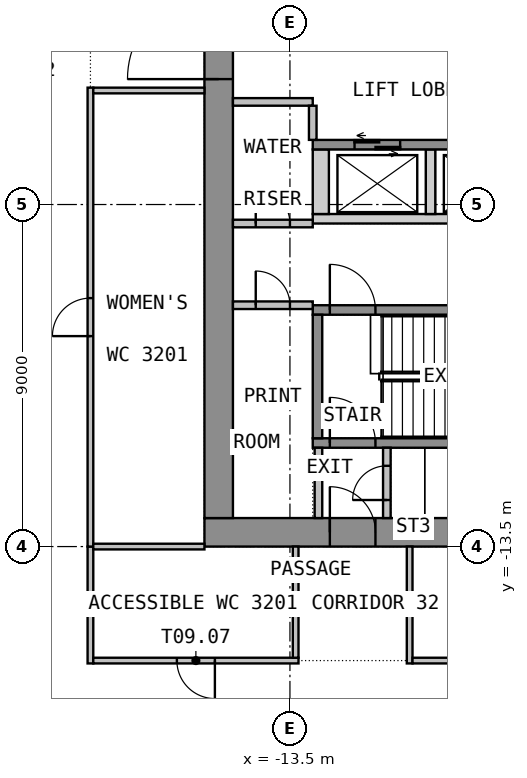
"""IFC4 building model, lengths in metres.
Left out: names, types, materials, properties, quantities, classifications, styles, units other than length and angle.
Written with IfcOpenShell. Run it as: python <this file> out.ifc"""

import sys

from ifc_helpers import new_model, si_unit, direction, frame, frame_2d, origin, place, context, subcontext, project, spatial, polyline, rectangle, outline, extrude, element, fill, save


model = new_model("IFC4")
c1 = context("Model", 3, precision=1e-05, world=origin(), true_north=direction((0.0, 1.0)))
c2 = subcontext(c1, "Body", "Model", "MODEL_VIEW")
j1 = project(units=[si_unit("LENGTHUNIT", "METRE"), si_unit("PLANEANGLEUNIT", "RADIAN")], contexts=[c1])
p1 = place(None, origin())
s1 = spatial("IfcSite", under=j1, at=p1, CompositionType="ELEMENT")
p2 = place(p1, origin())
s2 = spatial("IfcBuilding", under=s1, at=p2, CompositionType="ELEMENT")
p3 = place(p2, frame((0.0, 0.0, 132.6)))
s3 = spatial("IfcBuildingStorey", under=s2, at=p3, CompositionType="ELEMENT", Elevation=132.6)
p4 = place(p3, frame((-15.75, -13.125, 0.0), z_axis=(0.0, 0.0, 1.0), x_axis=(1.0, 0.0, 0.0)))
e1 = element("IfcWall", 1, at=p4, inside=s3, PredefinedType="SHEAR", context=c2, shape_type="SweptSolid", body=[
    extrude(rectangle(XDim=31.5, YDim=0.75, at=frame_2d((15.75, 0.0))), origin(), (0.0, 0.0, 1.0), 3.575),
])
p5 = place(p4, frame((14.55, 0.0, 0.0)))
e2 = element("IfcOpeningElement", 2, at=p5, cuts=e1, PredefinedType="OPENING", context=c2, shape_type="SweptSolid", body=[
    extrude(rectangle(XDim=2.4, YDim=2.1, at=frame_2d((1.2, 1.05))), frame((0.0, 0.385, 0.0), z_axis=(0.0, -1.0, 0.0), x_axis=(1.0, 0.0, 0.0)), (0.0, 0.0, 1.0), 0.77),
])
p6 = place(p4, frame((3.3, 0.0, 0.0)))
e3 = element("IfcOpeningElement", 3, at=p6, cuts=e1, PredefinedType="OPENING", context=c2, shape_type="SweptSolid", body=[
    extrude(rectangle(XDim=1.2, YDim=2.1, at=frame_2d((0.6, 1.05))), frame((0.0, 0.385, 0.0), z_axis=(0.0, -1.0, 0.0), x_axis=(1.0, 0.0, 0.0)), (0.0, 0.0, 1.0), 0.77),
])
p7 = place(p4, frame((27.0, 0.0, 0.0)))
e4 = element("IfcOpeningElement", 4, at=p7, cuts=e1, PredefinedType="OPENING", context=c2, shape_type="SweptSolid", body=[
    extrude(rectangle(XDim=1.2, YDim=2.1, at=frame_2d((0.6, 1.05))), frame((0.0, 0.385, 0.0), z_axis=(0.0, -1.0, 0.0), x_axis=(1.0, 0.0, 0.0)), (0.0, 0.0, 1.0), 0.77),
])
p8 = place(p3, frame((-15.375, -12.75, 0.0), z_axis=(0.0, 0.0, 1.0), x_axis=(0.0, 1.0, 0.0)))
e5 = element("IfcWall", 5, at=p8, inside=s3, PredefinedType="SHEAR", context=c2, shape_type="SweptSolid", body=[
    extrude(rectangle(XDim=25.5, YDim=0.75, at=frame_2d((12.75, 0.0))), origin(), (0.0, 0.0, 1.0), 3.575),
])
p9 = place(p8, frame((11.55, 0.0, 0.0)))
e6 = element("IfcOpeningElement", 6, at=p9, cuts=e5, PredefinedType="OPENING", context=c2, shape_type="SweptSolid", body=[
    extrude(rectangle(XDim=2.4, YDim=2.1, at=frame_2d((1.2, 1.05))), frame((0.0, 0.385, 0.0), z_axis=(0.0, -1.0, 0.0), x_axis=(1.0, 0.0, 0.0)), (0.0, 0.0, 1.0), 0.77),
])
p10 = place(p3, origin())
e7 = element("IfcWall", 7, at=p10, inside=s3, PredefinedType="SHEAR", context=c2, shape_type="SweptSolid", body=[
    extrude(outline(polyline([(-12.9, -5.0), (-4.075, -5.0), (-4.075, -4.75), (-12.9, -4.75), (-12.9, -5.0)])), origin(), (0.0, 0.0, 1.0), 3.575),
])
p11 = place(p3, origin())
e8 = element("IfcWall", 8, at=p11, inside=s3, PredefinedType="SHEAR", context=c2, shape_type="SweptSolid", body=[
    extrude(outline(polyline([(-12.9, -4.75), (-12.475, -4.75), (-12.475, -3.05), (-12.9, -3.05), (-12.9, -4.75)])), origin(), (0.0, 0.0, 1.0), 3.575),
])
p12 = place(p3, origin())
e9 = element("IfcWall", 9, at=p12, inside=s3, PredefinedType="SHEAR", context=c2, shape_type="SweptSolid", body=[
    extrude(outline(polyline([(-9.925, -4.75), (-9.675, -4.75), (-9.675, -3.05), (-9.925, -3.05), (-9.925, -4.75)])), origin(), (0.0, 0.0, 1.0), 3.575),
])
p13 = place(p3, frame((-12.9, -2.925, 0.0), z_axis=(0.0, 0.0, 1.0), x_axis=(1.0, 0.0, 0.0)))
e10 = element("IfcWall", 10, at=p13, inside=s3, PredefinedType="SHEAR", context=c2, shape_type="SweptSolid", body=[
    extrude(rectangle(XDim=8.825, YDim=0.25, at=frame_2d((4.413, 0.0))), origin(), (0.0, 0.0, 1.0), 3.575),
])
p14 = place(p13, frame((1.1, 0.0, 0.0)))
e11 = element("IfcOpeningElement", 11, at=p14, cuts=e10, PredefinedType="OPENING", context=c2, shape_type="SweptSolid", body=[
    extrude(rectangle(XDim=1.2, YDim=2.1, at=frame_2d((0.6, 1.05))), frame((0.0, 0.135, 0.0), z_axis=(0.0, -1.0, 0.0), x_axis=(1.0, 0.0, 0.0)), (0.0, 0.0, 1.0), 0.27),
])
p15 = place(p13, frame((3.9, 0.0, 0.0)))
e12 = element("IfcOpeningElement", 12, at=p15, cuts=e10, PredefinedType="OPENING", context=c2, shape_type="SweptSolid", body=[
    extrude(rectangle(XDim=1.2, YDim=2.1, at=frame_2d((0.6, 1.05))), frame((0.0, 0.135, 0.0), z_axis=(0.0, -1.0, 0.0), x_axis=(1.0, 0.0, 0.0)), (0.0, 0.0, 1.0), 0.27),
])
p16 = place(p13, frame((6.7, 0.0, 0.0)))
e13 = element("IfcOpeningElement", 13, at=p16, cuts=e10, PredefinedType="OPENING", context=c2, shape_type="SweptSolid", body=[
    extrude(rectangle(XDim=1.2, YDim=2.1, at=frame_2d((0.6, 1.05))), frame((0.0, 0.135, 0.0), z_axis=(0.0, -1.0, 0.0), x_axis=(1.0, 0.0, 0.0)), (0.0, 0.0, 1.0), 0.27),
])
p17 = place(p3, frame((-12.9, -10.775, 0.0), z_axis=(0.0, 0.0, 1.0), x_axis=(1.0, 0.0, 0.0)))
e14 = element("IfcWall", 14, at=p17, inside=s3, PredefinedType="SHEAR", context=c2, shape_type="SweptSolid", body=[
    extrude(rectangle(XDim=10.1, YDim=0.25, at=frame_2d((5.05, 0.0))), origin(), (0.0, 0.0, 1.0), 3.575),
])
p18 = place(p17, frame((0.45, 0.0, 0.0)))
e15 = element("IfcOpeningElement", 15, at=p18, cuts=e14, PredefinedType="OPENING", context=c2, shape_type="SweptSolid", body=[
    extrude(rectangle(XDim=1.2, YDim=2.1, at=frame_2d((0.6, 1.05))), frame((0.0, 0.135, 0.0), z_axis=(0.0, -1.0, 0.0), x_axis=(1.0, 0.0, 0.0)), (0.0, 0.0, 1.0), 0.27),
])
p19 = place(p3, frame((-12.9, -7.275, 0.0), z_axis=(0.0, 0.0, 1.0), x_axis=(1.0, 0.0, 0.0)))
e16 = element("IfcWall", 16, at=p19, inside=s3, PredefinedType="SHEAR", context=c2, shape_type="SweptSolid", body=[
    extrude(rectangle(XDim=10.1, YDim=0.25, at=frame_2d((5.05, 0.0))), origin(), (0.0, 0.0, 1.0), 3.575),
])
p20 = place(p19, frame((0.45, 0.0, 0.0)))
e17 = element("IfcOpeningElement", 17, at=p20, cuts=e16, PredefinedType="OPENING", context=c2, shape_type="SweptSolid", body=[
    extrude(rectangle(XDim=1.2, YDim=2.1, at=frame_2d((0.6, 1.05))), frame((0.0, 0.135, 0.0), z_axis=(0.0, -1.0, 0.0), x_axis=(1.0, 0.0, 0.0)), (0.0, 0.0, 1.0), 0.27),
])
p21 = place(p3, frame((-12.775, -10.65, 0.0), z_axis=(0.0, 0.0, 1.0), x_axis=(0.0, 1.0, 0.0)))
e18 = element("IfcWall", 18, at=p21, inside=s3, PredefinedType="SHEAR", context=c2, shape_type="SweptSolid", body=[
    extrude(rectangle(XDim=3.25, YDim=0.25, at=frame_2d((1.625, 0.0))), origin(), (0.0, 0.0, 1.0), 3.575),
])
p22 = place(p3, frame((-12.75, -12.75, 0.0), z_axis=(0.0, 0.0, 1.0), x_axis=(0.0, 1.0, 0.0)))
e19 = element("IfcWall", 19, at=p22, inside=s3, PredefinedType="PARTITIONING", context=c2, shape_type="SweptSolid", body=[
    extrude(rectangle(XDim=1.85, YDim=0.2, at=frame_2d((0.925, 0.0))), origin(), (0.0, 0.0, 1.0), 3.575),
])
p23 = place(p3, frame((-10.95, -12.75, 0.0), z_axis=(0.0, 0.0, 1.0), x_axis=(0.0, 1.0, 0.0)))
e20 = element("IfcWall", 20, at=p23, inside=s3, PredefinedType="PARTITIONING", context=c2, shape_type="SweptSolid", body=[
    extrude(rectangle(XDim=1.85, YDim=0.2, at=frame_2d((0.925, 0.0))), origin(), (0.0, 0.0, 1.0), 3.575),
])
p24 = place(p23, frame((0.475, 0.0, 0.0)))
e21 = element("IfcOpeningElement", 21, at=p24, cuts=e20, PredefinedType="OPENING", context=c2, shape_type="SweptSolid", body=[
    extrude(rectangle(XDim=0.9, YDim=2.1, at=frame_2d((0.45, 1.05))), frame((0.0, 0.11, 0.0), z_axis=(0.0, -1.0, 0.0), x_axis=(1.0, 0.0, 0.0)), (0.0, 0.0, 1.0), 0.22),
])
p25 = place(p3, frame((-15.0, -7.15, 0.0), z_axis=(0.0, 0.0, 1.0), x_axis=(1.0, 0.0, 0.0)))
e22 = element("IfcWall", 22, at=p25, inside=s3, PredefinedType="PARTITIONING", context=c2, shape_type="SweptSolid", body=[
    extrude(rectangle(XDim=2.1, YDim=0.2, at=frame_2d((1.05, 0.0))), origin(), (0.0, 0.0, 1.0), 3.575),
])
p26 = place(p25, frame((0.6, 0.0, 0.0)))
e23 = element("IfcOpeningElement", 23, at=p26, cuts=e22, PredefinedType="OPENING", context=c2, shape_type="SweptSolid", body=[
    extrude(rectangle(XDim=0.9, YDim=2.1, at=frame_2d((0.45, 1.05))), frame((0.0, 0.11, 0.0), z_axis=(0.0, -1.0, 0.0), x_axis=(1.0, 0.0, 0.0)), (0.0, 0.0, 1.0), 0.22),
])
p27 = place(p3, frame((-15.0, -5.0, 0.0), z_axis=(0.0, 0.0, 1.0), x_axis=(1.0, 0.0, 0.0)))
e24 = element("IfcWall", 24, at=p27, inside=s3, PredefinedType="PARTITIONING", context=c2, shape_type="SweptSolid", body=[
    extrude(rectangle(XDim=2.1, YDim=0.2, at=frame_2d((1.05, 0.0))), origin(), (0.0, 0.0, 1.0), 3.575),
])
p28 = place(p27, frame((0.6, 0.0, 0.0)))
e25 = element("IfcOpeningElement", 25, at=p28, cuts=e24, PredefinedType="OPENING", context=c2, shape_type="SweptSolid", body=[
    extrude(rectangle(XDim=0.9, YDim=2.1, at=frame_2d((0.45, 1.05))), frame((0.0, 0.11, 0.0), z_axis=(0.0, -1.0, 0.0), x_axis=(1.0, 0.0, 0.0)), (0.0, 0.0, 1.0), 0.22),
])
p29 = place(p3, frame((-15.0, -1.8, 0.0), z_axis=(0.0, 0.0, 1.0), x_axis=(1.0, 0.0, 0.0)))
e26 = element("IfcWall", 26, at=p29, inside=s3, PredefinedType="PARTITIONING", context=c2, shape_type="SweptSolid", body=[
    extrude(rectangle(XDim=2.1, YDim=0.2, at=frame_2d((1.05, 0.0))), origin(), (0.0, 0.0, 1.0), 3.575),
])
p30 = place(p3, frame((-18.75, -16.575, 0.0), z_axis=(0.0, 0.0, 1.0), x_axis=(0.0, 1.0, 0.0)))
e27 = element("IfcWall", 27, at=p30, inside=s3, PredefinedType="PARTITIONING", context=c2, shape_type="SweptSolid", body=[
    extrude(rectangle(XDim=3.075, YDim=0.15, at=frame_2d((1.538, 0.0))), origin(), (0.0, 0.0, 1.0), 3.575),
])
p31 = place(p3, frame((-13.275, -16.5, 0.0), z_axis=(0.0, 0.0, 1.0), x_axis=(-1.0, 0.0, 0.0)))
e28 = element("IfcWall", 28, at=p31, inside=s3, PredefinedType="PARTITIONING", context=c2, shape_type="SweptSolid", body=[
    extrude(rectangle(XDim=5.4, YDim=0.15, at=frame_2d((2.7, 0.0))), origin(), (0.0, 0.0, 1.0), 3.575),
])
p32 = place(p31, frame((2.2, 0.0, 0.0)))
e29 = element("IfcOpeningElement", 29, at=p32, cuts=e28, PredefinedType="OPENING", context=c2, shape_type="SweptSolid", body=[
    extrude(rectangle(XDim=1.0, YDim=2.1, at=frame_2d((0.5, 1.05))), frame((0.0, 0.085, 0.0), z_axis=(0.0, -1.0, 0.0), x_axis=(1.0, 0.0, 0.0)), (0.0, 0.0, 1.0), 0.17),
])
p33 = place(p3, frame((-18.75, -13.5, 0.0), z_axis=(0.0, 0.0, 1.0), x_axis=(0.0, 1.0, 0.0)))
e30 = element("IfcWall", 30, at=p33, inside=s3, PredefinedType="PARTITIONING", context=c2, shape_type="SweptSolid", body=[
    extrude(rectangle(XDim=12.075, YDim=0.15, at=frame_2d((6.038, 0.0))), origin(), (0.0, 0.0, 1.0), 3.575),
])
p34 = place(p33, frame((5.538, 0.0, 0.0)))
e31 = element("IfcOpeningElement", 31, at=p34, cuts=e30, PredefinedType="OPENING", context=c2, shape_type="SweptSolid", body=[
    extrude(rectangle(XDim=1.0, YDim=2.1, at=frame_2d((0.5, 1.05))), frame((0.0, 0.085, 0.0), z_axis=(0.0, -1.0, 0.0), x_axis=(1.0, 0.0, 0.0)), (0.0, 0.0, 1.0), 0.17),
])
for number, where, z_axis, x_axis in (
    (32, (-15.75, -13.5, 0.0), (0.0, 0.0, 1.0), (-1.0, 0.0, 0.0)),
    (33, (-18.675, -1.5, 0.0), (0.0, 0.0, 1.0), (1.0, 0.0, 0.0)),
    (34, (-13.35, -13.5, 0.0), (0.0, 0.0, 1.0), (0.0, -1.0, 0.0)),
):
    element("IfcWall", number, at=place(p3, frame(where, z_axis=z_axis, x_axis=x_axis)), inside=s3, PredefinedType="PARTITIONING", context=c2, shape_type="SweptSolid", body=[
        extrude(rectangle(XDim=2.925, YDim=0.15, at=frame_2d((1.462, 0.0))), origin(), (0.0, 0.0, 1.0), 3.575),
    ])
p35 = place(p3, frame((-10.35, -16.575, 0.0), z_axis=(0.0, 0.0, 1.0), x_axis=(0.0, 1.0, 0.0)))
e35 = element("IfcWall", 35, at=p35, inside=s3, PredefinedType="PARTITIONING", context=c2, shape_type="SweptSolid", body=[
    extrude(rectangle(XDim=3.075, YDim=0.15, at=frame_2d((1.538, 0.0))), origin(), (0.0, 0.0, 1.0), 3.575),
])
p36 = place(p3, frame((-1.425, -16.5, 0.0), z_axis=(0.0, 0.0, 1.0), x_axis=(-1.0, 0.0, 0.0)))
e36 = element("IfcWall", 36, at=p36, inside=s3, PredefinedType="PARTITIONING", context=c2, shape_type="SweptSolid", body=[
    extrude(rectangle(XDim=8.85, YDim=0.15, at=frame_2d((4.425, 0.0))), origin(), (0.0, 0.0, 1.0), 3.575),
])
p37 = place(p36, frame((3.925, 0.0, 0.0)))
e37 = element("IfcOpeningElement", 37, at=p37, cuts=e36, PredefinedType="OPENING", context=c2, shape_type="SweptSolid", body=[
    extrude(rectangle(XDim=1.0, YDim=2.1, at=frame_2d((0.5, 1.05))), frame((0.0, 0.085, 0.0), z_axis=(0.0, -1.0, 0.0), x_axis=(1.0, 0.0, 0.0)), (0.0, 0.0, 1.0), 0.17),
])
p38 = place(p3, frame((-12.9, -2.799, 0.0), z_axis=(0.0, 0.0, 1.0), x_axis=(0.0, 1.0, 0.0)))
e38 = element("IfcWall", 38, at=p38, inside=s3, PredefinedType="PARTITIONING", context=c2, shape_type="SweptSolid", body=[
    extrude(rectangle(XDim=0.898, YDim=0.2, at=frame_2d((0.449, 0.0))), origin(), (0.0, 0.0, 1.0), 3.575),
])
p39 = place(p9, origin())
e39 = element("IfcDoor", 39, at=p39, inside=s3, OperationType="DOUBLE_DOOR_DOUBLE_SWING", PredefinedType="DOOR", context=c2, shape_type="SweptSolid", body=[
    extrude(rectangle(XDim=2.4, YDim=2.1, at=frame_2d((1.2, 1.05))), frame((0.0, 0.025, 0.0), z_axis=(0.0, -1.0, 0.0), x_axis=(1.0, 0.0, 0.0)), (0.0, 0.0, 1.0), 0.05),
])
fill(e6, e39)
p40 = place(p6, origin())
e40 = element("IfcDoor", 40, at=p40, inside=s3, OperationType="SINGLE_SWING_RIGHT", PredefinedType="DOOR", context=c2, shape_type="SweptSolid", body=[
    extrude(rectangle(XDim=1.2, YDim=2.1, at=frame_2d((0.6, 1.05))), frame((0.0, 0.025, 0.0), z_axis=(0.0, -1.0, 0.0), x_axis=(1.0, 0.0, 0.0)), (0.0, 0.0, 1.0), 0.05),
])
fill(e3, e40)
p41 = place(p14, origin())
e41 = element("IfcDoor", 41, at=p41, inside=s3, OperationType="DOUBLE_DOOR_SLIDING", PredefinedType="DOOR", context=c2, shape_type="SweptSolid", body=[
    extrude(rectangle(XDim=1.2, YDim=2.1, at=frame_2d((0.6, 1.05))), frame((0.0, 0.025, 0.0), z_axis=(0.0, -1.0, 0.0), x_axis=(1.0, 0.0, 0.0)), (0.0, 0.0, 1.0), 0.05),
])
fill(e11, e41)
p42 = place(p20, origin())
e42 = element("IfcDoor", 42, at=p42, inside=s3, OperationType="SINGLE_SWING_LEFT", PredefinedType="DOOR", context=c2, shape_type="SweptSolid", body=[
    extrude(rectangle(XDim=1.2, YDim=2.1, at=frame_2d((0.6, 1.05))), frame((0.0, 0.025, 0.0), z_axis=(0.0, -1.0, 0.0), x_axis=(1.0, 0.0, 0.0)), (0.0, 0.0, 1.0), 0.05),
])
fill(e17, e42)
p43 = place(p18, origin())
e43 = element("IfcDoor", 43, at=p43, inside=s3, OperationType="SINGLE_SWING_RIGHT", PredefinedType="DOOR", context=c2, shape_type="SweptSolid", body=[
    extrude(rectangle(XDim=1.2, YDim=2.1, at=frame_2d((0.6, 1.05))), frame((0.0, 0.025, 0.0), z_axis=(0.0, -1.0, 0.0), x_axis=(1.0, 0.0, 0.0)), (0.0, 0.0, 1.0), 0.05),
])
fill(e15, e43)
p44 = place(p24, origin())
e44 = element("IfcDoor", 44, at=p44, inside=s3, OperationType="SINGLE_SWING_LEFT", PredefinedType="DOOR", context=c2, shape_type="SweptSolid", body=[
    extrude(rectangle(XDim=0.9, YDim=2.1, at=frame_2d((0.45, 1.05))), frame((0.0, 0.025, 0.0), z_axis=(0.0, -1.0, 0.0), x_axis=(1.0, 0.0, 0.0)), (0.0, 0.0, 1.0), 0.05),
])
fill(e21, e44)
p45 = place(p26, origin())
e45 = element("IfcDoor", 45, at=p45, inside=s3, OperationType="SINGLE_SWING_LEFT", PredefinedType="DOOR", context=c2, shape_type="SweptSolid", body=[
    extrude(rectangle(XDim=0.9, YDim=2.1, at=frame_2d((0.45, 1.05))), frame((0.0, 0.025, 0.0), z_axis=(0.0, -1.0, 0.0), x_axis=(1.0, 0.0, 0.0)), (0.0, 0.0, 1.0), 0.05),
])
fill(e23, e45)
p46 = place(p28, origin())
e46 = element("IfcDoor", 46, at=p46, inside=s3, OperationType="SINGLE_SWING_LEFT", PredefinedType="DOOR", context=c2, shape_type="SweptSolid", body=[
    extrude(rectangle(XDim=0.9, YDim=2.1, at=frame_2d((0.45, 1.05))), frame((0.0, 0.025, 0.0), z_axis=(0.0, -1.0, 0.0), x_axis=(1.0, 0.0, 0.0)), (0.0, 0.0, 1.0), 0.05),
])
fill(e25, e46)
p47 = place(p34, origin())
e47 = element("IfcDoor", 47, at=p47, inside=s3, OperationType="SINGLE_SWING_RIGHT", PredefinedType="DOOR", context=c2, shape_type="SweptSolid", body=[
    extrude(rectangle(XDim=1.0, YDim=2.1, at=frame_2d((0.5, 1.05))), frame((0.0, 0.025, 0.0), z_axis=(0.0, -1.0, 0.0), x_axis=(1.0, 0.0, 0.0)), (0.0, 0.0, 1.0), 0.05),
])
fill(e31, e47)
p48 = place(p32, origin())
e48 = element("IfcDoor", 48, at=p48, inside=s3, OperationType="SINGLE_SWING_RIGHT", PredefinedType="DOOR", context=c2, shape_type="SweptSolid", body=[
    extrude(rectangle(XDim=1.0, YDim=2.1, at=frame_2d((0.5, 1.05))), frame((0.0, 0.025, 0.0), z_axis=(0.0, -1.0, 0.0), x_axis=(1.0, 0.0, 0.0)), (0.0, 0.0, 1.0), 0.05),
])
fill(e29, e48)
save(model, sys.argv[1])
